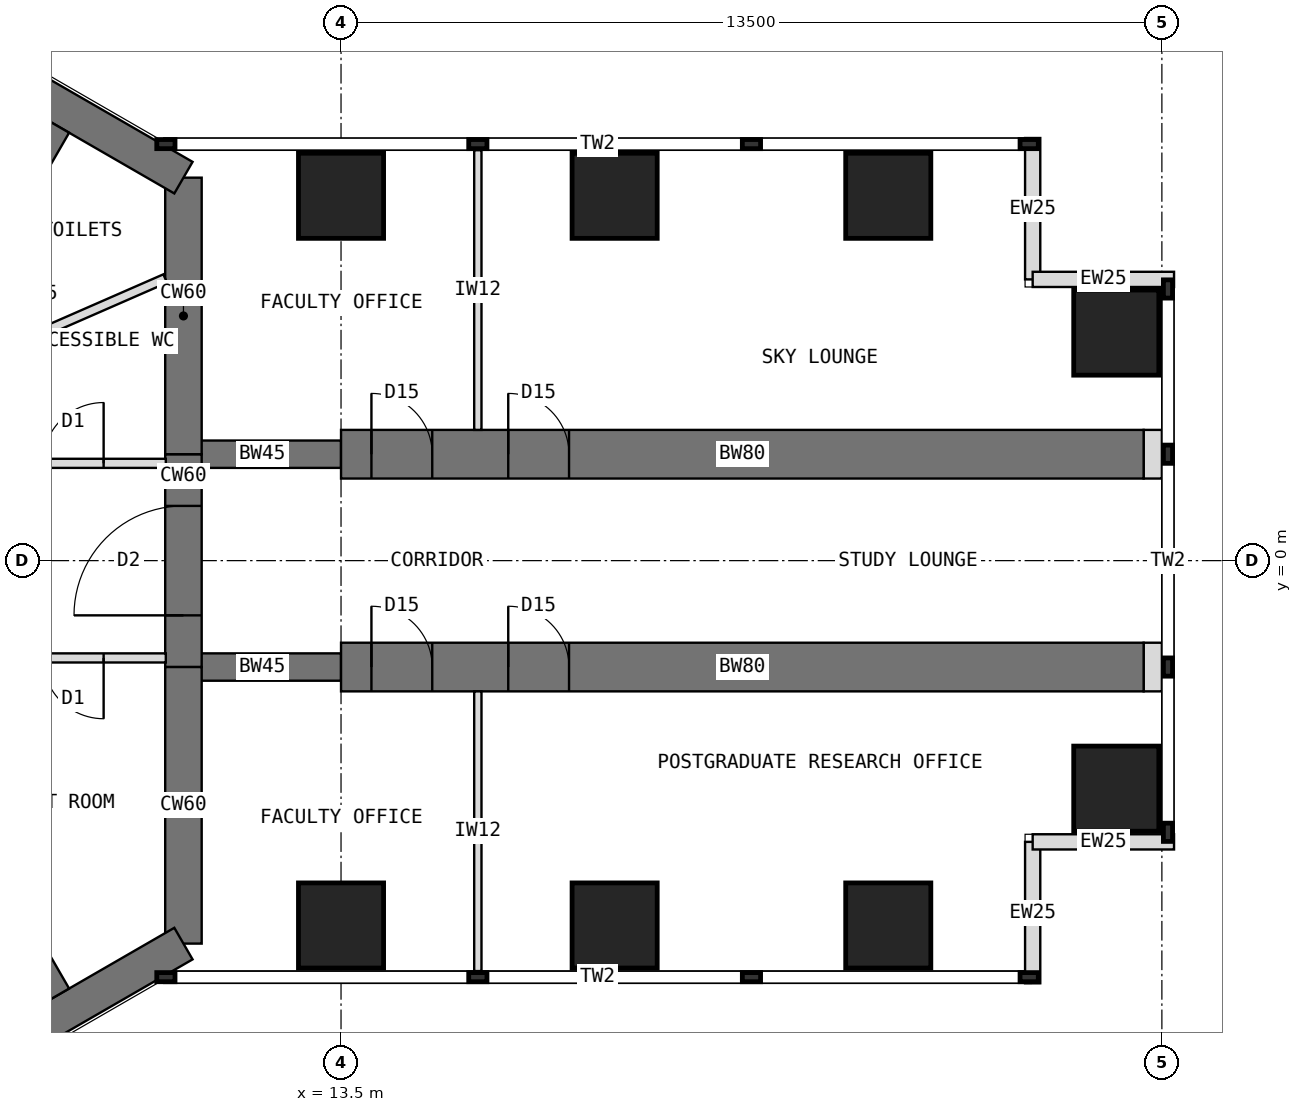
"""IFC4 building model, lengths in metres.
Left out: names, types, materials, properties, quantities, classifications, styles, units other than length and angle.
Written with IfcOpenShell. Run it as: python <this file> out.ifc"""

import sys

from ifc_helpers import new_model, si_unit, direction, frame, frame_2d, origin, origin_2d, place, context, subcontext, project, spatial, rectangle, extrude, element, fill, save


model = new_model("IFC4")
c1 = context("Model", 3, precision=1e-05, world=origin(), true_north=direction((0.0, 1.0)))
c2 = subcontext(c1, "Body", "Model", "MODEL_VIEW")
j1 = project(units=[si_unit("LENGTHUNIT", "METRE"), si_unit("PLANEANGLEUNIT", "RADIAN")], contexts=[c1])
p1 = place(None, origin())
s1 = spatial("IfcSite", under=j1, at=p1, CompositionType="ELEMENT")
p2 = place(p1, origin())
s2 = spatial("IfcBuilding", under=s1, at=p2, CompositionType="ELEMENT")
p3 = place(p2, frame((0.0, 0.0, 97.5)))
s3 = spatial("IfcBuildingStorey", under=s2, at=p3, CompositionType="ELEMENT", Elevation=97.5)
p4 = place(p3, frame((10.908, -6.298, 0.0), z_axis=(0.0, 0.0, 1.0), x_axis=(0.0, 1.0, 0.0)))
e1 = element("IfcWall", 1, at=p4, inside=s3, PredefinedType="SHEAR", context=c2, shape_type="SweptSolid", body=[
    extrude(rectangle(XDim=4.548, YDim=0.6, at=frame_2d((2.274, 0.0))), origin(), (0.0, 0.0, 1.0), 4.0),
])
p5 = place(p3, frame((10.908, -1.75, 0.0), z_axis=(0.0, 0.0, 1.0), x_axis=(0.0, 1.0, 0.0)))
e2 = element("IfcWall", 2, at=p5, inside=s3, PredefinedType="SHEAR", context=c2, shape_type="SweptSolid", body=[
    extrude(rectangle(XDim=3.5, YDim=0.6, at=frame_2d((1.75, 0.0))), origin(), (0.0, 0.0, 1.0), 4.0),
])
p6 = place(p5, frame((0.85, 0.0, 0.0)))
e3 = element("IfcOpeningElement", 3, at=p6, cuts=e2, PredefinedType="OPENING", context=c2, shape_type="SweptSolid", body=[
    extrude(rectangle(XDim=1.8, YDim=2.1, at=frame_2d((0.9, 1.05))), frame((0.0, 0.31, 0.0), z_axis=(0.0, -1.0, 0.0), x_axis=(1.0, 0.0, 0.0)), (0.0, 0.0, 1.0), 0.62),
])
p7 = place(p3, frame((10.908, 1.75, 0.0), z_axis=(0.0, 0.0, 1.0), x_axis=(0.0, 1.0, 0.0)))
e4 = element("IfcWall", 4, at=p7, inside=s3, PredefinedType="SHEAR", context=c2, shape_type="SweptSolid", body=[
    extrude(rectangle(XDim=4.548, YDim=0.6, at=frame_2d((2.274, 0.0))), origin(), (0.0, 0.0, 1.0), 4.0),
])
for number, where, z_axis, x_axis in (
    (5, (10.908, 6.298, 0.0), (0.0, 0.0, 1.0), (-0.866, 0.5, 0.0)),
    (6, (0.0, -12.596, 0.0), (0.0, 0.0, 1.0), (0.866, 0.5, 0.0)),
):
    element("IfcWall", number, at=place(p3, frame(where, z_axis=z_axis, x_axis=x_axis)), inside=s3, PredefinedType="SHEAR", context=c2, shape_type="SweptSolid", body=[
        extrude(rectangle(XDim=12.596, YDim=0.6, at=frame_2d((6.298, 0.0))), origin(), (0.0, 0.0, 1.0), 4.0),
    ])
p8 = place(p3, frame((10.908, 1.75, 0.0), z_axis=(0.0, 0.0, 1.0), x_axis=(1.0, 0.0, 0.0)))
e7 = element("IfcWall", 7, at=p8, inside=s3, PredefinedType="SHEAR", context=c2, shape_type="SweptSolid", body=[
    extrude(rectangle(XDim=2.592, YDim=0.45, at=frame_2d((1.296, 0.0))), origin(), (0.0, 0.0, 1.0), 4.0),
])
p9 = place(p3, frame((13.5, 1.75, 0.0), z_axis=(0.0, 0.0, 1.0), x_axis=(1.0, 0.0, 0.0)))
e8 = element("IfcWall", 8, at=p9, inside=s3, PredefinedType="SHEAR", context=c2, shape_type="SweptSolid", body=[
    extrude(rectangle(XDim=13.2, YDim=0.8, at=frame_2d((6.6, 0.0))), origin(), (0.0, 0.0, 1.0), 4.0),
])
p10 = place(p9, frame((0.5, 0.0, 0.0)))
e9 = element("IfcOpeningElement", 9, at=p10, cuts=e8, PredefinedType="OPENING", context=c2, shape_type="SweptSolid", body=[
    extrude(rectangle(XDim=1.0, YDim=2.1, at=frame_2d((0.5, 1.05))), frame((0.0, 0.41, 0.0), z_axis=(0.0, -1.0, 0.0), x_axis=(1.0, 0.0, 0.0)), (0.0, 0.0, 1.0), 0.82),
])
p11 = place(p9, frame((2.75, 0.0, 0.0)))
e10 = element("IfcOpeningElement", 10, at=p11, cuts=e8, PredefinedType="OPENING", context=c2, shape_type="SweptSolid", body=[
    extrude(rectangle(XDim=1.0, YDim=2.1, at=frame_2d((0.5, 1.05))), frame((0.0, 0.41, 0.0), z_axis=(0.0, -1.0, 0.0), x_axis=(1.0, 0.0, 0.0)), (0.0, 0.0, 1.0), 0.82),
])
p12 = place(p3, frame((10.908, -1.75, 0.0), z_axis=(0.0, 0.0, 1.0), x_axis=(1.0, 0.0, 0.0)))
e11 = element("IfcWall", 11, at=p12, inside=s3, PredefinedType="SHEAR", context=c2, shape_type="SweptSolid", body=[
    extrude(rectangle(XDim=2.592, YDim=0.45, at=frame_2d((1.296, 0.0))), origin(), (0.0, 0.0, 1.0), 4.0),
])
p13 = place(p3, frame((13.5, -1.75, 0.0), z_axis=(0.0, 0.0, 1.0), x_axis=(1.0, 0.0, 0.0)))
e12 = element("IfcWall", 12, at=p13, inside=s3, PredefinedType="SHEAR", context=c2, shape_type="SweptSolid", body=[
    extrude(rectangle(XDim=13.2, YDim=0.8, at=frame_2d((6.6, 0.0))), origin(), (0.0, 0.0, 1.0), 4.0),
])
p14 = place(p13, frame((0.5, 0.0, 0.0)))
e13 = element("IfcOpeningElement", 13, at=p14, cuts=e12, PredefinedType="OPENING", context=c2, shape_type="SweptSolid", body=[
    extrude(rectangle(XDim=1.0, YDim=2.1, at=frame_2d((0.5, 1.05))), frame((0.0, 0.41, 0.0), z_axis=(0.0, -1.0, 0.0), x_axis=(1.0, 0.0, 0.0)), (0.0, 0.0, 1.0), 0.82),
])
p15 = place(p13, frame((2.75, 0.0, 0.0)))
e14 = element("IfcOpeningElement", 14, at=p15, cuts=e12, PredefinedType="OPENING", context=c2, shape_type="SweptSolid", body=[
    extrude(rectangle(XDim=1.0, YDim=2.1, at=frame_2d((0.5, 1.05))), frame((0.0, 0.41, 0.0), z_axis=(0.0, -1.0, 0.0), x_axis=(1.0, 0.0, 0.0)), (0.0, 0.0, 1.0), 0.82),
])
for number, where, z_axis, x_axis in (
    (15, (13.5, 6.0, 0.0), (0.0, 0.0, 1.0), (1.0, 0.0, 0.0)),
    (16, (13.5, -6.0, 0.0), (0.0, 0.0, 1.0), (1.0, 0.0, 0.0)),
    (17, (18.0, 6.0, 0.0), (0.0, 0.0, 1.0), (1.0, 0.0, 0.0)),
    (18, (18.0, -6.0, 0.0), (0.0, 0.0, 1.0), (1.0, 0.0, 0.0)),
    (19, (22.5, 6.0, 0.0), (0.0, 0.0, 1.0), (1.0, 0.0, 0.0)),
    (20, (22.5, -6.0, 0.0), (0.0, 0.0, 1.0), (1.0, 0.0, 0.0)),
    (21, (26.25, 3.75, 0.0), (0.0, 0.0, 1.0), (1.0, 0.0, 0.0)),
    (22, (26.25, -3.75, 0.0), (0.0, 0.0, 1.0), (1.0, 0.0, 0.0)),
):
    element("IfcColumn", number, at=place(p3, frame(where, z_axis=z_axis, x_axis=x_axis)), inside=s3, PredefinedType="COLUMN", context=c2, shape_type="SweptSolid", body=[
        extrude(rectangle(XDim=1.4, YDim=1.4, at=origin_2d()), origin(), (0.0, 0.0, 1.0), 4.0),
    ])
for number, where, z_axis, x_axis in (
    (23, (24.875, 6.95, 0.0), (0.0, 0.0, 1.0), (0.0, -1.0, 0.0)),
    (24, (24.875, 4.625, 0.0), (0.0, 0.0, 1.0), (1.0, 0.0, 0.0)),
    (25, (24.875, -6.95, 0.0), (0.0, 0.0, 1.0), (0.0, 1.0, 0.0)),
    (26, (24.875, -4.625, 0.0), (0.0, 0.0, 1.0), (1.0, 0.0, 0.0)),
):
    element("IfcWall", number, at=place(p3, frame(where, z_axis=z_axis, x_axis=x_axis)), inside=s3, PredefinedType="STANDARD", context=c2, shape_type="SweptSolid", body=[
        extrude(rectangle(XDim=2.325, YDim=0.25, at=frame_2d((1.163, 0.0))), origin(), (0.0, 0.0, 1.0), 3.8),
    ])
for number, where, z_axis, x_axis in (
    (27, (26.7, 1.75, 0.0), (0.0, 0.0, 1.0), (1.0, 0.0, 0.0)),
    (28, (26.7, -1.75, 0.0), (0.0, 0.0, 1.0), (1.0, 0.0, 0.0)),
):
    element("IfcWall", number, at=place(p3, frame(where, z_axis=z_axis, x_axis=x_axis)), inside=s3, PredefinedType="PARTITIONING", context=c2, shape_type="SweptSolid", body=[
        extrude(rectangle(XDim=0.3, YDim=0.8, at=frame_2d((0.15, 0.0))), origin(), (0.0, 0.0, 1.0), 3.8),
    ])
for number, where, z_axis, x_axis in (
    (29, (5.901, 2.02, 0.0), (0.0, 0.0, 1.0), (0.5, 0.866, 0.0)),
    (30, (5.901, -2.02, 0.0), (0.0, 0.0, 1.0), (0.5, -0.866, 0.0)),
):
    element("IfcWall", number, at=place(p3, frame(where, z_axis=z_axis, x_axis=x_axis)), inside=s3, PredefinedType="SHEAR", context=c2, shape_type="SweptSolid", body=[
        extrude(rectangle(XDim=5.908, YDim=0.4, at=frame_2d((2.954, 0.0))), origin(), (0.0, 0.0, 1.0), 4.0),
    ])
for number, where, z_axis, x_axis in (
    (31, (15.75, 2.15, 0.0), (0.0, 0.0, 1.0), (0.0, 1.0, 0.0)),
    (32, (15.75, -2.15, 0.0), (0.0, 0.0, 1.0), (0.0, -1.0, 0.0)),
):
    element("IfcWall", number, at=place(p3, frame(where, z_axis=z_axis, x_axis=x_axis)), inside=s3, PredefinedType="PARTITIONING", context=c2, shape_type="SweptSolid", body=[
        extrude(rectangle(XDim=4.6, YDim=0.12, at=frame_2d((2.3, 0.0))), origin(), (0.0, 0.0, 1.0), 3.8),
    ])
p16 = place(p3, frame((5.523, 1.6, 0.0), z_axis=(0.0, 0.0, 1.0), x_axis=(1.0, 0.0, 0.0)))
e33 = element("IfcWall", 33, at=p16, inside=s3, PredefinedType="PARTITIONING", context=c2, shape_type="SweptSolid", body=[
    extrude(rectangle(XDim=5.096, YDim=0.15, at=frame_2d((2.548, 0.0))), origin(), (0.0, 0.0, 1.0), 3.8),
])
p17 = place(p16, frame((3.073, 0.0, 0.0)))
e34 = element("IfcOpeningElement", 34, at=p17, cuts=e33, PredefinedType="OPENING", context=c2, shape_type="SweptSolid", body=[
    extrude(rectangle(XDim=1.0, YDim=2.1, at=frame_2d((0.5, 1.05))), frame((0.0, 0.085, 0.0), z_axis=(0.0, -1.0, 0.0), x_axis=(1.0, 0.0, 0.0)), (0.0, 0.0, 1.0), 0.17),
])
p18 = place(p3, frame((10.618, -1.6, 0.0), z_axis=(0.0, 0.0, 1.0), x_axis=(-1.0, 0.0, 0.0)))
e35 = element("IfcWall", 35, at=p18, inside=s3, PredefinedType="PARTITIONING", context=c2, shape_type="SweptSolid", body=[
    extrude(rectangle(XDim=5.096, YDim=0.15, at=frame_2d((2.548, 0.0))), origin(), (0.0, 0.0, 1.0), 3.8),
])
p19 = place(p18, frame((1.023, 0.0, 0.0)))
e36 = element("IfcOpeningElement", 36, at=p19, cuts=e35, PredefinedType="OPENING", context=c2, shape_type="SweptSolid", body=[
    extrude(rectangle(XDim=1.0, YDim=2.1, at=frame_2d((0.5, 1.05))), frame((0.0, 0.085, 0.0), z_axis=(0.0, -1.0, 0.0), x_axis=(1.0, 0.0, 0.0)), (0.0, 0.0, 1.0), 0.17),
])
p20 = place(p3, frame((6.333, 2.77, 0.0), z_axis=(0.0, 0.0, 1.0), x_axis=(0.916207765353, 0.400703544664, 0.0)))
e37 = element("IfcWall", 37, at=p20, inside=s3, PredefinedType="PARTITIONING", context=c2, shape_type="SweptSolid", body=[
    extrude(rectangle(XDim=4.666, YDim=0.15, at=frame_2d((2.333, 0.0))), origin(), (0.0, 0.0, 1.0), 3.8),
])
p21 = place(p20, frame((0.9, 0.0, 0.0)))
e38 = element("IfcOpeningElement", 38, at=p21, cuts=e37, PredefinedType="OPENING", context=c2, shape_type="SweptSolid", body=[
    extrude(rectangle(XDim=1.0, YDim=2.1, at=frame_2d((0.5, 1.05))), frame((0.0, 0.085, 0.0), z_axis=(0.0, -1.0, 0.0), x_axis=(1.0, 0.0, 0.0)), (0.0, 0.0, 1.0), 0.17),
])
p22 = place(p6, origin())
e39 = element("IfcDoor", 39, at=p22, inside=s3, OperationType="DOUBLE_DOOR_DOUBLE_SWING", PredefinedType="DOOR", context=c2, shape_type="SweptSolid", body=[
    extrude(rectangle(XDim=1.72, YDim=2.06, at=frame_2d((0.9, 1.03))), frame((0.0, 0.025, 0.0), z_axis=(0.0, -1.0, 0.0), x_axis=(1.0, 0.0, 0.0)), (0.0, 0.0, 1.0), 0.05),
    extrude(rectangle(XDim=0.04, YDim=2.1, at=frame_2d((0.02, 1.05))), frame((0.0, 0.3, 0.0), z_axis=(0.0, -1.0, 0.0), x_axis=(1.0, 0.0, 0.0)), (0.0, 0.0, 1.0), 0.6),
    extrude(rectangle(XDim=0.04, YDim=2.1, at=frame_2d((1.78, 1.05))), frame((0.0, 0.3, 0.0), z_axis=(0.0, -1.0, 0.0), x_axis=(1.0, 0.0, 0.0)), (0.0, 0.0, 1.0), 0.6),
    extrude(rectangle(XDim=1.72, YDim=0.04, at=frame_2d((0.9, 2.08))), frame((0.0, 0.3, 0.0), z_axis=(0.0, -1.0, 0.0), x_axis=(1.0, 0.0, 0.0)), (0.0, 0.0, 1.0), 0.6),
])
fill(e3, e39)
p23 = place(p19, origin())
e40 = element("IfcDoor", 40, at=p23, inside=s3, OperationType="SINGLE_SWING_LEFT", PredefinedType="DOOR", context=c2, shape_type="SweptSolid", body=[
    extrude(rectangle(XDim=1.0, YDim=2.1, at=frame_2d((0.5, 1.05))), frame((0.0, 0.025, 0.0), z_axis=(0.0, -1.0, 0.0), x_axis=(1.0, 0.0, 0.0)), (0.0, 0.0, 1.0), 0.05),
])
fill(e36, e40)
p24 = place(p17, origin())
e41 = element("IfcDoor", 41, at=p24, inside=s3, OperationType="SINGLE_SWING_RIGHT", PredefinedType="DOOR", context=c2, shape_type="SweptSolid", body=[
    extrude(rectangle(XDim=1.0, YDim=2.1, at=frame_2d((0.5, 1.05))), frame((0.0, 0.025, 0.0), z_axis=(0.0, -1.0, 0.0), x_axis=(1.0, 0.0, 0.0)), (0.0, 0.0, 1.0), 0.05),
])
fill(e34, e41)
p25 = place(p10, origin())
e42 = element("IfcDoor", 42, at=p25, inside=s3, OperationType="SINGLE_SWING_LEFT", PredefinedType="DOOR", context=c2, shape_type="SweptSolid", body=[
    extrude(rectangle(XDim=0.92, YDim=2.06, at=frame_2d((0.5, 1.03))), frame((0.0, 0.025, 0.0), z_axis=(0.0, -1.0, 0.0), x_axis=(1.0, 0.0, 0.0)), (0.0, 0.0, 1.0), 0.05),
    extrude(rectangle(XDim=0.04, YDim=2.1, at=frame_2d((0.02, 1.05))), frame((0.0, 0.4, 0.0), z_axis=(0.0, -1.0, 0.0), x_axis=(1.0, 0.0, 0.0)), (0.0, 0.0, 1.0), 0.8),
    extrude(rectangle(XDim=0.04, YDim=2.1, at=frame_2d((0.98, 1.05))), frame((0.0, 0.4, 0.0), z_axis=(0.0, -1.0, 0.0), x_axis=(1.0, 0.0, 0.0)), (0.0, 0.0, 1.0), 0.8),
    extrude(rectangle(XDim=0.92, YDim=0.04, at=frame_2d((0.5, 2.08))), frame((0.0, 0.4, 0.0), z_axis=(0.0, -1.0, 0.0), x_axis=(1.0, 0.0, 0.0)), (0.0, 0.0, 1.0), 0.8),
])
fill(e9, e42)
p26 = place(p11, origin())
e43 = element("IfcDoor", 43, at=p26, inside=s3, OperationType="SINGLE_SWING_LEFT", PredefinedType="DOOR", context=c2, shape_type="SweptSolid", body=[
    extrude(rectangle(XDim=0.92, YDim=2.06, at=frame_2d((0.5, 1.03))), frame((0.0, 0.025, 0.0), z_axis=(0.0, -1.0, 0.0), x_axis=(1.0, 0.0, 0.0)), (0.0, 0.0, 1.0), 0.05),
    extrude(rectangle(XDim=0.04, YDim=2.1, at=frame_2d((0.02, 1.05))), frame((0.0, 0.4, 0.0), z_axis=(0.0, -1.0, 0.0), x_axis=(1.0, 0.0, 0.0)), (0.0, 0.0, 1.0), 0.8),
    extrude(rectangle(XDim=0.04, YDim=2.1, at=frame_2d((0.98, 1.05))), frame((0.0, 0.4, 0.0), z_axis=(0.0, -1.0, 0.0), x_axis=(1.0, 0.0, 0.0)), (0.0, 0.0, 1.0), 0.8),
    extrude(rectangle(XDim=0.92, YDim=0.04, at=frame_2d((0.5, 2.08))), frame((0.0, 0.4, 0.0), z_axis=(0.0, -1.0, 0.0), x_axis=(1.0, 0.0, 0.0)), (0.0, 0.0, 1.0), 0.8),
])
fill(e10, e43)
p27 = place(p14, origin())
e44 = element("IfcDoor", 44, at=p27, inside=s3, OperationType="SINGLE_SWING_LEFT", PredefinedType="DOOR", context=c2, shape_type="SweptSolid", body=[
    extrude(rectangle(XDim=0.92, YDim=2.06, at=frame_2d((0.5, 1.03))), frame((0.0, 0.025, 0.0), z_axis=(0.0, -1.0, 0.0), x_axis=(1.0, 0.0, 0.0)), (0.0, 0.0, 1.0), 0.05),
    extrude(rectangle(XDim=0.04, YDim=2.1, at=frame_2d((0.02, 1.05))), frame((0.0, 0.4, 0.0), z_axis=(0.0, -1.0, 0.0), x_axis=(1.0, 0.0, 0.0)), (0.0, 0.0, 1.0), 0.8),
    extrude(rectangle(XDim=0.04, YDim=2.1, at=frame_2d((0.98, 1.05))), frame((0.0, 0.4, 0.0), z_axis=(0.0, -1.0, 0.0), x_axis=(1.0, 0.0, 0.0)), (0.0, 0.0, 1.0), 0.8),
    extrude(rectangle(XDim=0.92, YDim=0.04, at=frame_2d((0.5, 2.08))), frame((0.0, 0.4, 0.0), z_axis=(0.0, -1.0, 0.0), x_axis=(1.0, 0.0, 0.0)), (0.0, 0.0, 1.0), 0.8),
])
fill(e13, e44)
p28 = place(p15, origin())
e45 = element("IfcDoor", 45, at=p28, inside=s3, OperationType="SINGLE_SWING_LEFT", PredefinedType="DOOR", context=c2, shape_type="SweptSolid", body=[
    extrude(rectangle(XDim=0.92, YDim=2.06, at=frame_2d((0.5, 1.03))), frame((0.0, 0.025, 0.0), z_axis=(0.0, -1.0, 0.0), x_axis=(1.0, 0.0, 0.0)), (0.0, 0.0, 1.0), 0.05),
    extrude(rectangle(XDim=0.04, YDim=2.1, at=frame_2d((0.02, 1.05))), frame((0.0, 0.4, 0.0), z_axis=(0.0, -1.0, 0.0), x_axis=(1.0, 0.0, 0.0)), (0.0, 0.0, 1.0), 0.8),
    extrude(rectangle(XDim=0.04, YDim=2.1, at=frame_2d((0.98, 1.05))), frame((0.0, 0.4, 0.0), z_axis=(0.0, -1.0, 0.0), x_axis=(1.0, 0.0, 0.0)), (0.0, 0.0, 1.0), 0.8),
    extrude(rectangle(XDim=0.92, YDim=0.04, at=frame_2d((0.5, 2.08))), frame((0.0, 0.4, 0.0), z_axis=(0.0, -1.0, 0.0), x_axis=(1.0, 0.0, 0.0)), (0.0, 0.0, 1.0), 0.8),
])
fill(e14, e45)
save(model, sys.argv[1])
